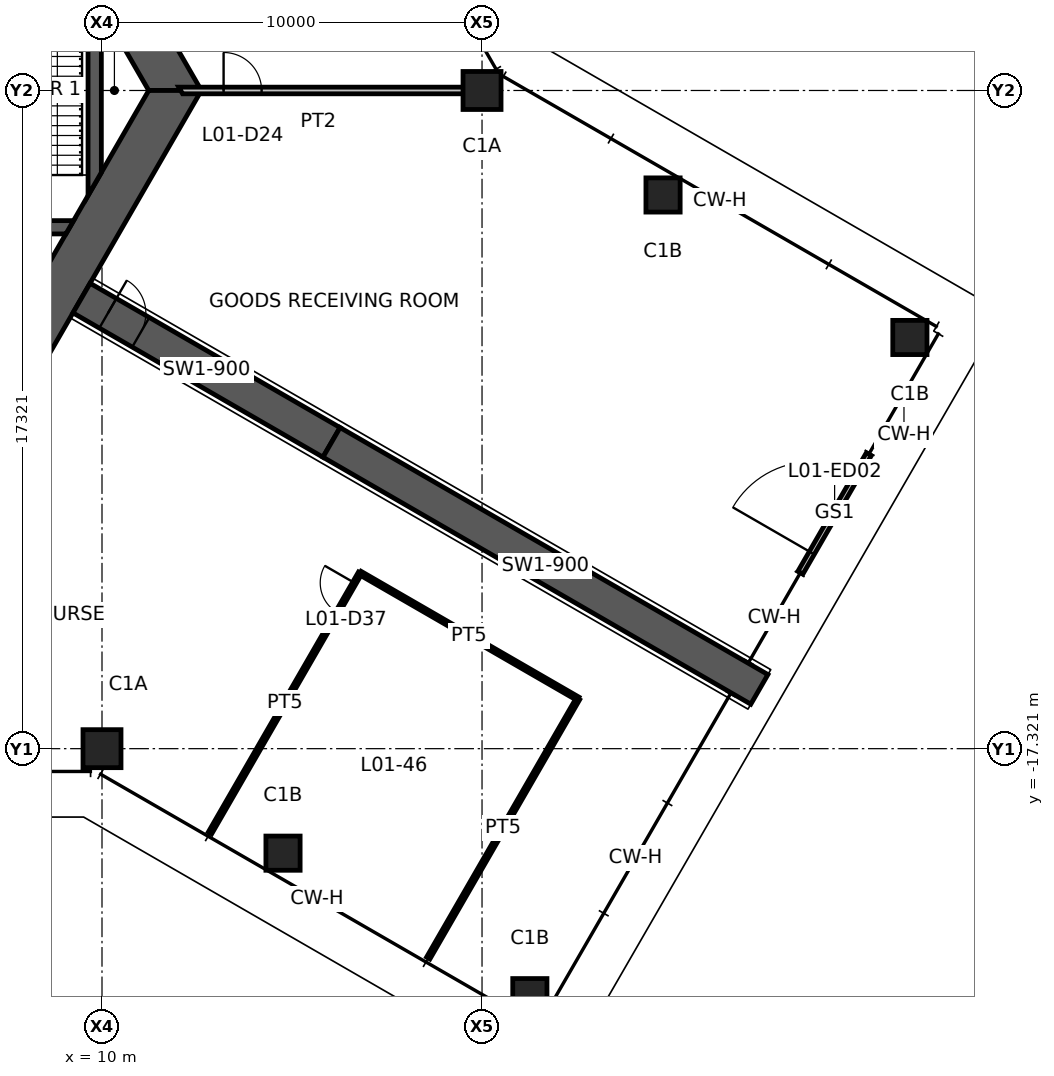
"""IFC4 building model, lengths in metres.
Left out: names, types, materials, properties, quantities, classifications, styles, units other than length and angle.
Written with IfcOpenShell. Run it as: python <this file> out.ifc"""

import sys

from ifc_helpers import new_model, si_unit, direction, frame, frame_2d, origin, origin_2d, place, context, subcontext, project, spatial, polyline, rectangle, hollow_rectangle, outline, extrude, element, fill, save


model = new_model("IFC4")
c1 = context("Model", 3, precision=1e-05, world=origin(), true_north=direction((0.0, 1.0)))
c2 = subcontext(c1, "Body", "Model", "MODEL_VIEW")
j1 = project(units=[si_unit("LENGTHUNIT", "METRE"), si_unit("PLANEANGLEUNIT", "RADIAN")], contexts=[c1])
p1 = place(None, origin())
s1 = spatial("IfcSite", under=j1, at=p1, CompositionType="ELEMENT")
p2 = place(p1, origin())
s2 = spatial("IfcBuilding", under=s1, at=p2, CompositionType="ELEMENT")
p3 = place(p2, origin())
s3 = spatial("IfcBuildingStorey", under=s2, at=p3, CompositionType="ELEMENT", Elevation=0.0)
for number, where, z_axis, x_axis in (
    (1, (20.0, 0.0, 0.0), (0.0, 0.0, 1.0), (1.0, 0.0, 0.0)),
    (2, (10.0, -17.321, 0.0), (0.0, 0.0, 1.0), (1.0, 0.0, 0.0)),
):
    element("IfcColumn", number, at=place(p3, frame(where, z_axis=z_axis, x_axis=x_axis)), inside=s3, PredefinedType="COLUMN", context=c2, shape_type="SweptSolid", body=[
        extrude(hollow_rectangle(XDim=1.0, YDim=1.0, WallThickness=0.06, at=origin_2d()), origin(), (0.0, 0.0, 1.0), 5.5),
    ])
for number, where, z_axis, x_axis in (
    (3, (14.763, -20.071, 0.0), (0.0, 0.0, 1.0), (1.0, 0.0, 0.0)),
    (4, (21.258, -23.821, 0.0), (0.0, 0.0, 1.0), (1.0, 0.0, 0.0)),
    (5, (24.763, -2.75, 0.0), (0.0, 0.0, 1.0), (1.0, 0.0, 0.0)),
    (6, (31.258, -6.5, 0.0), (0.0, 0.0, 1.0), (1.0, 0.0, 0.0)),
):
    element("IfcColumn", number, at=place(p3, frame(where, z_axis=z_axis, x_axis=x_axis)), inside=s3, PredefinedType="COLUMN", context=c2, shape_type="SweptSolid", body=[
        extrude(hollow_rectangle(XDim=0.9, YDim=0.9, WallThickness=0.05, at=origin_2d()), origin(), (0.0, 0.0, 1.0), 5.5),
    ])
p4 = place(p3, frame((11.922, 0.0, 0.0), z_axis=(0.0, 0.0, 1.0), x_axis=(-0.500004296715, 0.866022923061, 0.0)))
e7 = element("IfcWall", 7, at=p4, inside=s3, PredefinedType="SHEAR", context=c2, shape_type="SweptSolid", body=[
    extrude(outline(polyline([(-0.346, -0.6), (5.835, -0.6), (6.635, -0.6), (12.269, -0.6), (11.576, 0.6), (6.635, 0.6), (5.835, 0.6), (0.346, 0.6), (-0.346, -0.6)])), origin(), (0.0, 0.0, 1.0), 5.5),
])
p5 = place(p4, frame((5.835, 0.0, 0.0)))
e8 = element("IfcOpeningElement", 8, at=p5, cuts=e7, PredefinedType="OPENING", context=c2, shape_type="SweptSolid", body=[
    extrude(rectangle(XDim=0.8, YDim=2.1, at=frame_2d((0.4, 1.05))), frame((0.0, 0.61, 0.0), z_axis=(0.0, -1.0, 0.0), x_axis=(1.0, 0.0, 0.0)), (0.0, 0.0, 1.0), 1.22),
])
p6 = place(p3, frame((5.961, -10.325, 0.0), z_axis=(0.0, 0.0, 1.0), x_axis=(0.500004296715, 0.866022923061, 0.0)))
e9 = element("IfcWall", 9, at=p6, inside=s3, PredefinedType="SHEAR", context=c2, shape_type="SweptSolid", body=[
    extrude(outline(polyline([(-0.346, -0.6), (3.208, -0.6), (4.009, -0.6), (12.269, -0.6), (11.576, 0.6), (4.009, 0.6), (3.208, 0.6), (0.346, 0.6), (-0.346, -0.6)])), origin(), (0.0, 0.0, 1.0), 5.5),
])
p7 = place(p6, frame((3.208, 0.0, 0.0)))
e10 = element("IfcOpeningElement", 10, at=p7, cuts=e9, PredefinedType="OPENING", context=c2, shape_type="SweptSolid", body=[
    extrude(rectangle(XDim=0.8, YDim=2.1, at=frame_2d((0.4, 1.05))), frame((0.0, 0.61, 0.0), z_axis=(0.0, -1.0, 0.0), x_axis=(1.0, 0.0, 0.0)), (0.0, 0.0, 1.0), 1.22),
])
p8 = place(p3, frame((9.461, -5.462, 0.0), z_axis=(0.0, 0.0, 1.0), x_axis=(0.866019116917, -0.500010889016, 0.0)))
e11 = element("IfcWall", 11, at=p8, inside=s3, PredefinedType="SHEAR", context=c2, shape_type="SweptSolid", body=[
    extrude(rectangle(XDim=7.595, YDim=0.9, at=frame_2d((3.798, 0.0))), origin(), (0.0, 0.0, 1.0), 5.5),
])
p9 = place(p8, frame((0.8, 0.0, 0.0)))
e12 = element("IfcOpeningElement", 12, at=p9, cuts=e11, PredefinedType="OPENING", context=c2, shape_type="SweptSolid", body=[
    extrude(rectangle(XDim=1.0, YDim=2.1, at=frame_2d((0.5, 1.05))), frame((0.0, 0.46, 0.0), z_axis=(0.0, -1.0, 0.0), x_axis=(1.0, 0.0, 0.0)), (0.0, 0.0, 1.0), 0.92),
])
p10 = place(p3, frame((16.039, -9.26, 0.0), z_axis=(0.0, 0.0, 1.0), x_axis=(0.866024837091, -0.50000098154, 0.0)))
e13 = element("IfcWall", 13, at=p10, inside=s3, PredefinedType="SHEAR", context=c2, shape_type="SweptSolid", body=[
    extrude(rectangle(XDim=13.0, YDim=0.9, at=frame_2d((6.5, 0.0))), origin(), (0.0, 0.0, 1.0), 5.5),
])
p11 = place(p3, frame((28.378, -12.689, 0.0), z_axis=(0.0, 0.0, 1.0), x_axis=(0.500012057535, 0.866018442252, 0.0)))
e14 = element("IfcWall", 14, at=p11, inside=s3, PredefinedType="STANDARD", context=c2, shape_type="SweptSolid", body=[
    extrude(rectangle(XDim=3.6, YDim=0.15, at=frame_2d((1.8, 0.0))), origin(), (0.0, 0.0, 1.0), 5.5),
])
p12 = place(p11, frame((0.6, 0.0, 0.0)))
e15 = element("IfcOpeningElement", 15, at=p12, cuts=e14, PredefinedType="OPENING", context=c2, shape_type="SweptSolid", body=[
    extrude(rectangle(XDim=2.4, YDim=2.7, at=frame_2d((1.2, 1.35))), frame((0.0, 0.085, 0.0), z_axis=(0.0, -1.0, 0.0), x_axis=(1.0, 0.0, 0.0)), (0.0, 0.0, 1.0), 0.17),
])
p13 = place(p3, frame((1.425, -3.6, 0.0), z_axis=(0.0, 0.0, 1.0), x_axis=(1.0, 0.0, 0.0)))
e16 = element("IfcWall", 16, at=p13, inside=s3, PredefinedType="SHEAR", context=c2, shape_type="SweptSolid", body=[
    extrude(outline(polyline([(0.0, -0.175), (1.125, -0.175), (2.125, -0.175), (7.625, -0.175), (7.827, 0.175), (2.125, 0.175), (1.125, 0.175), (0.0, 0.175), (0.0, -0.175)])), origin(), (0.0, 0.0, 1.0), 5.5),
])
p14 = place(p13, frame((1.125, 0.0, 0.0)))
e17 = element("IfcOpeningElement", 17, at=p14, cuts=e16, PredefinedType="OPENING", context=c2, shape_type="SweptSolid", body=[
    extrude(rectangle(XDim=1.0, YDim=2.1, at=frame_2d((0.5, 1.05))), frame((0.0, 0.185, 0.0), z_axis=(0.0, -1.0, 0.0), x_axis=(1.0, 0.0, 0.0)), (0.0, 0.0, 1.0), 0.37),
])
p15 = place(p3, frame((9.808, -2.462, 0.0), z_axis=(0.0, 0.0, 1.0), x_axis=(0.0, 1.0, 0.0)))
e18 = element("IfcWall", 18, at=p15, inside=s3, PredefinedType="SHEAR", context=c2, shape_type="SweptSolid", body=[
    extrude(outline(polyline([(0.303, -0.175), (4.621, -0.175), (5.228, 0.175), (-0.303, 0.175), (0.303, -0.175)])), origin(), (0.0, 0.0, 1.0), 5.5),
])
p16 = place(p3, frame((12.07, 0.0, 0.0), z_axis=(0.0, 0.0, 1.0), x_axis=(1.0, 0.0, 0.0)))
e19 = element("IfcWall", 19, at=p16, inside=s3, PredefinedType="PARTITIONING", context=c2, shape_type="SweptSolid", body=[
    extrude(outline(polyline([(0.051, -0.087), (1.129, -0.087), (2.129, -0.087), (7.93, -0.087), (7.93, 0.087), (2.129, 0.087), (1.129, 0.087), (-0.051, 0.087), (0.051, -0.087)])), origin(), (0.0, 0.0, 1.0), 4.6),
])
p17 = place(p16, frame((1.129, 0.0, 0.0)))
e20 = element("IfcOpeningElement", 20, at=p17, cuts=e19, PredefinedType="OPENING", context=c2, shape_type="SweptSolid", body=[
    extrude(rectangle(XDim=1.0, YDim=2.1, at=frame_2d((0.5, 1.05))), frame((0.0, 0.098, 0.0), z_axis=(0.0, -1.0, 0.0), x_axis=(1.0, 0.0, 0.0)), (0.0, 0.0, 1.0), 0.195),
])
p18 = place(p3, frame((12.842, -19.539, 0.0), z_axis=(0.0, 0.0, 1.0), x_axis=(0.499997992926, 0.866026562566, 0.0)))
e21 = element("IfcWall", 21, at=p18, inside=s3, PredefinedType="PARTITIONING", context=c2, shape_type="SweptSolid", body=[
    extrude(rectangle(XDim=7.9, YDim=0.1, at=frame_2d((3.95, 0.0))), origin(), (0.0, 0.0, 1.0), 4.5),
])
p19 = place(p18, frame((6.7, 0.0, 0.0)))
e22 = element("IfcOpeningElement", 22, at=p19, cuts=e21, PredefinedType="OPENING", context=c2, shape_type="SweptSolid", body=[
    extrude(rectangle(XDim=0.9, YDim=2.1, at=frame_2d((0.45, 1.05))), frame((0.0, 0.06, 0.0), z_axis=(0.0, -1.0, 0.0), x_axis=(1.0, 0.0, 0.0)), (0.0, 0.0, 1.0), 0.12),
])
p20 = place(p3, frame((16.792, -12.697, 0.0), z_axis=(0.0, 0.0, 1.0), x_axis=(0.866021597574, -0.500006592492, 0.0)))
e23 = element("IfcWall", 23, at=p20, inside=s3, PredefinedType="PARTITIONING", context=c2, shape_type="SweptSolid", body=[
    extrude(rectangle(XDim=6.62, YDim=0.1, at=frame_2d((3.31, 0.0))), origin(), (0.0, 0.0, 1.0), 4.5),
])
p21 = place(p3, frame((22.525, -16.007, 0.0), z_axis=(0.0, 0.0, 1.0), x_axis=(-0.49999779889, -0.866026674592, 0.0)))
e24 = element("IfcWall", 24, at=p21, inside=s3, PredefinedType="PARTITIONING", context=c2, shape_type="SweptSolid", body=[
    extrude(rectangle(XDim=7.88, YDim=0.1, at=frame_2d((3.94, 0.0))), origin(), (0.0, 0.0, 1.0), 4.5),
])
p22 = place(p12, origin())
e25 = element("IfcDoor", 25, at=p22, inside=s3, OperationType="DOUBLE_DOOR_SINGLE_SWING", PredefinedType="DOOR", context=c2, shape_type="SweptSolid", body=[
    extrude(rectangle(XDim=2.4, YDim=2.7, at=frame_2d((1.2, 1.35))), frame((0.0, 0.025, 0.0), z_axis=(0.0, -1.0, 0.0), x_axis=(1.0, 0.0, 0.0)), (0.0, 0.0, 1.0), 0.05),
])
fill(e15, e25)
p23 = place(p9, origin())
e26 = element("IfcDoor", 26, at=p23, inside=s3, OperationType="SINGLE_SWING_LEFT", PredefinedType="DOOR", context=c2, shape_type="SweptSolid", body=[
    extrude(rectangle(XDim=1.0, YDim=2.1, at=frame_2d((0.5, 1.05))), frame((0.0, 0.025, 0.0), z_axis=(0.0, -1.0, 0.0), x_axis=(1.0, 0.0, 0.0)), (0.0, 0.0, 1.0), 0.05),
])
fill(e12, e26)
p24 = place(p17, origin())
e27 = element("IfcDoor", 27, at=p24, inside=s3, OperationType="SINGLE_SWING_LEFT", PredefinedType="DOOR", context=c2, shape_type="SweptSolid", body=[
    extrude(rectangle(XDim=1.0, YDim=2.1, at=frame_2d((0.5, 1.05))), frame((0.0, 0.025, 0.0), z_axis=(0.0, -1.0, 0.0), x_axis=(1.0, 0.0, 0.0)), (0.0, 0.0, 1.0), 0.05),
])
fill(e20, e27)
p25 = place(p19, origin())
e28 = element("IfcDoor", 28, at=p25, inside=s3, OperationType="SINGLE_SWING_RIGHT", PredefinedType="DOOR", context=c2, shape_type="SweptSolid", body=[
    extrude(rectangle(XDim=0.9, YDim=2.1, at=frame_2d((0.45, 1.05))), frame((0.0, 0.025, 0.0), z_axis=(0.0, -1.0, 0.0), x_axis=(1.0, 0.0, 0.0)), (0.0, 0.0, 1.0), 0.05),
])
fill(e22, e28)
save(model, sys.argv[1])
